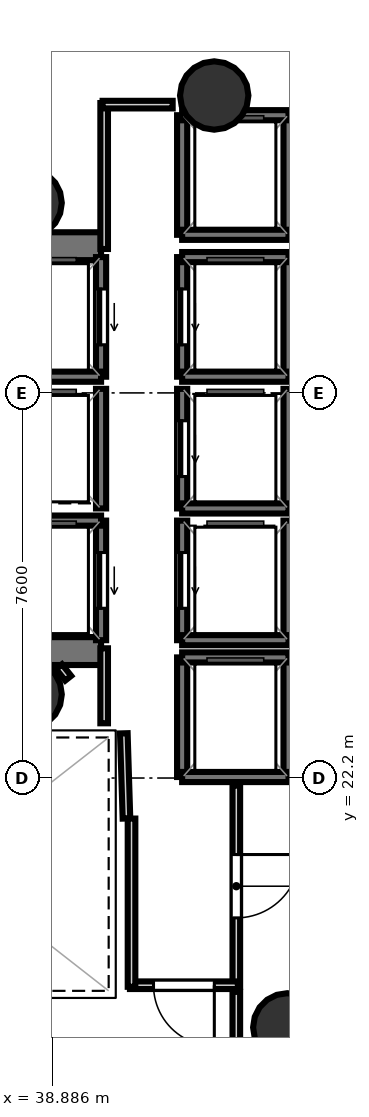
"""IFC4 building model, lengths in metres.
Left out: names, types, materials, properties, quantities, classifications, styles, units other than length and angle.
Written with IfcOpenShell. Run it as: python <this file> out.ifc"""

import sys

from ifc_helpers import new_model, si_unit, direction, frame, frame_2d, origin, origin_2d, place, context, subcontext, project, spatial, rectangle, hollow_circle, extrude, element, fill, save


model = new_model("IFC4")
c1 = context("Model", 3, precision=1e-05, world=origin(), true_north=direction((0.0, 1.0)))
c2 = subcontext(c1, "Body", "Model", "MODEL_VIEW")
j1 = project(units=[si_unit("LENGTHUNIT", "METRE"), si_unit("PLANEANGLEUNIT", "RADIAN")], contexts=[c1])
p1 = place(None, origin())
s1 = spatial("IfcSite", under=j1, at=p1, CompositionType="ELEMENT")
p2 = place(p1, origin())
s2 = spatial("IfcBuilding", under=s1, at=p2, CompositionType="ELEMENT")
p3 = place(p2, frame((0.0, 0.0, 155.0)))
s3 = spatial("IfcBuildingStorey", under=s2, at=p3, CompositionType="ELEMENT", Elevation=155.0)
p4 = place(p3, frame((29.23, 32.695, 0.0), z_axis=(0.0, 0.0, 1.0), x_axis=(1.0, 0.0, 0.0)))
e1 = element("IfcWall", 1, at=p4, inside=s3, PredefinedType="SHEAR", context=c2, shape_type="SweptSolid", body=[
    extrude(rectangle(XDim=10.62, YDim=0.55, at=frame_2d((5.31, 0.0))), origin(), (0.0, 0.0, 1.0), 3.52),
])
p5 = place(p4, frame((0.995, 0.0, 0.0)))
e2 = element("IfcOpeningElement", 2, at=p5, cuts=e1, PredefinedType="OPENING", context=c2, shape_type="SweptSolid", body=[
    extrude(rectangle(XDim=1.25, YDim=2.15, at=frame_2d((0.625, 1.075))), frame((0.0, 0.285, 0.0), z_axis=(0.0, -1.0, 0.0), x_axis=(1.0, 0.0, 0.0)), (0.0, 0.0, 1.0), 0.57),
])
p6 = place(p3, frame((29.23, 24.705, 0.0), z_axis=(0.0, 0.0, 1.0), x_axis=(1.0, 0.0, 0.0)))
e3 = element("IfcWall", 3, at=p6, inside=s3, PredefinedType="SHEAR", context=c2, shape_type="SweptSolid", body=[
    extrude(rectangle(XDim=10.62, YDim=0.55, at=frame_2d((5.31, 0.0))), origin(), (0.0, 0.0, 1.0), 3.52),
])
p7 = place(p6, frame((0.795, 0.0, 0.0)))
e4 = element("IfcOpeningElement", 4, at=p7, cuts=e3, PredefinedType="OPENING", context=c2, shape_type="SweptSolid", body=[
    extrude(rectangle(XDim=1.25, YDim=2.15, at=frame_2d((0.625, 1.075))), frame((0.0, 0.285, 0.0), z_axis=(0.0, -1.0, 0.0), x_axis=(1.0, 0.0, 0.0)), (0.0, 0.0, 1.0), 0.57),
])
for number, where, z_axis, x_axis in (
    (5, (38.4, 33.55, 0.0), (0.0, 0.0, 1.0), (1.0, 0.0, 0.0)),
    (6, (38.4, 23.85, 0.0), (0.0, 0.0, 1.0), (1.0, 0.0, 0.0)),
    (7, (42.083, 35.669, 0.0), (0.0, 0.0, 1.0), (1.0, 0.0, 0.0)),
    (8, (43.525, 17.279, 0.0), (0.0, 0.0, 1.0), (1.0, 0.0, 0.0)),
):
    element("IfcColumn", number, at=place(p3, frame(where, z_axis=z_axis, x_axis=x_axis)), inside=s3, PredefinedType="COLUMN", context=c2, shape_type="SweptSolid", body=[
        extrude(hollow_circle(Radius=0.675, WallThickness=0.032, at=origin_2d()), origin(), (0.0, 0.0, 1.0), 3.7),
    ])
p8 = place(p3, frame((39.85, 30.12, 0.0), z_axis=(0.0, 0.0, 1.0), x_axis=(0.0, 1.0, 0.0)))
e9 = element("IfcWall", 9, at=p8, inside=s3, PredefinedType="SOLIDWALL", context=c2, shape_type="SweptSolid", body=[
    extrude(rectangle(XDim=2.36, YDim=0.2, at=frame_2d((1.18, 0.0))), origin(), (0.0, 0.0, 1.0), 3.52),
])
p9 = place(p8, frame((0.63, 0.0, 0.0)))
e10 = element("IfcOpeningElement", 10, at=p9, cuts=e9, PredefinedType="OPENING", context=c2, shape_type="SweptSolid", body=[
    extrude(rectangle(XDim=1.1, YDim=2.15, at=frame_2d((0.55, 1.075))), frame((0.0, 0.11, 0.0), z_axis=(0.0, -1.0, 0.0), x_axis=(1.0, 0.0, 0.0)), (0.0, 0.0, 1.0), 0.22),
])
p10 = place(p3, frame((37.75, 30.12, 0.0), z_axis=(0.0, 0.0, 1.0), x_axis=(1.0, 0.0, 0.0)))
e11 = element("IfcWall", 11, at=p10, inside=s3, PredefinedType="SOLIDWALL", context=c2, shape_type="SweptSolid", body=[
    extrude(rectangle(XDim=2.1, YDim=0.2, at=frame_2d((1.05, 0.0))), origin(), (0.0, 0.0, 1.0), 3.52),
])
p11 = place(p3, frame((39.85, 24.92, 0.0), z_axis=(0.0, 0.0, 1.0), x_axis=(0.0, 1.0, 0.0)))
e12 = element("IfcWall", 12, at=p11, inside=s3, PredefinedType="SOLIDWALL", context=c2, shape_type="SweptSolid", body=[
    extrude(rectangle(XDim=2.36, YDim=0.2, at=frame_2d((1.18, 0.0))), origin(), (0.0, 0.0, 1.0), 3.52),
])
p12 = place(p11, frame((0.63, 0.0, 0.0)))
e13 = element("IfcOpeningElement", 13, at=p12, cuts=e12, PredefinedType="OPENING", context=c2, shape_type="SweptSolid", body=[
    extrude(rectangle(XDim=1.1, YDim=2.15, at=frame_2d((0.55, 1.075))), frame((0.0, 0.11, 0.0), z_axis=(0.0, -1.0, 0.0), x_axis=(1.0, 0.0, 0.0)), (0.0, 0.0, 1.0), 0.22),
])
p13 = place(p3, frame((37.75, 27.28, 0.0), z_axis=(0.0, 0.0, 1.0), x_axis=(1.0, 0.0, 0.0)))
e14 = element("IfcWall", 14, at=p13, inside=s3, PredefinedType="SOLIDWALL", context=c2, shape_type="SweptSolid", body=[
    extrude(rectangle(XDim=2.1, YDim=0.2, at=frame_2d((1.05, 0.0))), origin(), (0.0, 0.0, 1.0), 3.52),
])
p14 = place(p3, frame((43.55, 30.12, 0.0), z_axis=(0.0, 0.0, 1.0), x_axis=(0.0, 1.0, 0.0)))
e15 = element("IfcWall", 15, at=p14, inside=s3, PredefinedType="SOLIDWALL", context=c2, shape_type="SweptSolid", body=[
    extrude(rectangle(XDim=2.36, YDim=0.2, at=frame_2d((1.18, 0.0))), origin(), (0.0, 0.0, 1.0), 3.52),
])
p15 = place(p3, frame((41.45, 30.12, 0.0), z_axis=(0.0, 0.0, 1.0), x_axis=(0.0, 1.0, 0.0)))
e16 = element("IfcWall", 16, at=p15, inside=s3, PredefinedType="SOLIDWALL", context=c2, shape_type="SweptSolid", body=[
    extrude(rectangle(XDim=2.36, YDim=0.2, at=frame_2d((1.18, 0.0))), origin(), (0.0, 0.0, 1.0), 3.52),
])
p16 = place(p15, frame((0.63, 0.0, 0.0)))
e17 = element("IfcOpeningElement", 17, at=p16, cuts=e16, PredefinedType="OPENING", context=c2, shape_type="SweptSolid", body=[
    extrude(rectangle(XDim=1.1, YDim=2.15, at=frame_2d((0.55, 1.075))), frame((0.0, 0.11, 0.0), z_axis=(0.0, -1.0, 0.0), x_axis=(1.0, 0.0, 0.0)), (0.0, 0.0, 1.0), 0.22),
])
for number, where, z_axis, x_axis in (
    (18, (41.45, 32.48, 0.0), (0.0, 0.0, 1.0), (1.0, 0.0, 0.0)),
    (19, (41.45, 30.12, 0.0), (0.0, 0.0, 1.0), (1.0, 0.0, 0.0)),
):
    element("IfcWall", number, at=place(p3, frame(where, z_axis=z_axis, x_axis=x_axis)), inside=s3, PredefinedType="SOLIDWALL", context=c2, shape_type="SweptSolid", body=[
        extrude(rectangle(XDim=2.1, YDim=0.2, at=frame_2d((1.05, 0.0))), origin(), (0.0, 0.0, 1.0), 3.52),
    ])
p17 = place(p3, frame((43.55, 27.52, 0.0), z_axis=(0.0, 0.0, 1.0), x_axis=(0.0, 1.0, 0.0)))
e20 = element("IfcWall", 20, at=p17, inside=s3, PredefinedType="SOLIDWALL", context=c2, shape_type="SweptSolid", body=[
    extrude(rectangle(XDim=2.36, YDim=0.2, at=frame_2d((1.18, 0.0))), origin(), (0.0, 0.0, 1.0), 3.52),
])
p18 = place(p3, frame((41.45, 27.52, 0.0), z_axis=(0.0, 0.0, 1.0), x_axis=(0.0, 1.0, 0.0)))
e21 = element("IfcWall", 21, at=p18, inside=s3, PredefinedType="SOLIDWALL", context=c2, shape_type="SweptSolid", body=[
    extrude(rectangle(XDim=2.36, YDim=0.2, at=frame_2d((1.18, 0.0))), origin(), (0.0, 0.0, 1.0), 3.52),
])
p19 = place(p18, frame((0.63, 0.0, 0.0)))
e22 = element("IfcOpeningElement", 22, at=p19, cuts=e21, PredefinedType="OPENING", context=c2, shape_type="SweptSolid", body=[
    extrude(rectangle(XDim=1.1, YDim=2.15, at=frame_2d((0.55, 1.075))), frame((0.0, 0.11, 0.0), z_axis=(0.0, -1.0, 0.0), x_axis=(1.0, 0.0, 0.0)), (0.0, 0.0, 1.0), 0.22),
])
p20 = place(p3, frame((41.45, 27.52, 0.0), z_axis=(0.0, 0.0, 1.0), x_axis=(1.0, 0.0, 0.0)))
e23 = element("IfcWall", 23, at=p20, inside=s3, PredefinedType="SOLIDWALL", context=c2, shape_type="SweptSolid", body=[
    extrude(rectangle(XDim=2.1, YDim=0.2, at=frame_2d((1.05, 0.0))), origin(), (0.0, 0.0, 1.0), 3.52),
])
p21 = place(p3, frame((43.55, 24.92, 0.0), z_axis=(0.0, 0.0, 1.0), x_axis=(0.0, 1.0, 0.0)))
e24 = element("IfcWall", 24, at=p21, inside=s3, PredefinedType="SOLIDWALL", context=c2, shape_type="SweptSolid", body=[
    extrude(rectangle(XDim=2.36, YDim=0.2, at=frame_2d((1.18, 0.0))), origin(), (0.0, 0.0, 1.0), 3.52),
])
p22 = place(p3, frame((41.45, 24.92, 0.0), z_axis=(0.0, 0.0, 1.0), x_axis=(0.0, 1.0, 0.0)))
e25 = element("IfcWall", 25, at=p22, inside=s3, PredefinedType="SOLIDWALL", context=c2, shape_type="SweptSolid", body=[
    extrude(rectangle(XDim=2.36, YDim=0.2, at=frame_2d((1.18, 0.0))), origin(), (0.0, 0.0, 1.0), 3.52),
])
p23 = place(p22, frame((0.63, 0.0, 0.0)))
e26 = element("IfcOpeningElement", 26, at=p23, cuts=e25, PredefinedType="OPENING", context=c2, shape_type="SweptSolid", body=[
    extrude(rectangle(XDim=1.1, YDim=2.15, at=frame_2d((0.55, 1.075))), frame((0.0, 0.11, 0.0), z_axis=(0.0, -1.0, 0.0), x_axis=(1.0, 0.0, 0.0)), (0.0, 0.0, 1.0), 0.22),
])
p24 = place(p3, frame((41.45, 24.92, 0.0), z_axis=(0.0, 0.0, 1.0), x_axis=(1.0, 0.0, 0.0)))
e27 = element("IfcWall", 27, at=p24, inside=s3, PredefinedType="SOLIDWALL", context=c2, shape_type="SweptSolid", body=[
    extrude(rectangle(XDim=2.1, YDim=0.2, at=frame_2d((1.05, 0.0))), origin(), (0.0, 0.0, 1.0), 3.52),
])
p25 = place(p3, frame((39.85, 27.52, 0.0), z_axis=(0.0, 0.0, 1.0), x_axis=(0.0, 1.0, 0.0)))
e28 = element("IfcWall", 28, at=p25, inside=s3, PredefinedType="SOLIDWALL", context=c2, shape_type="SweptSolid", body=[
    extrude(rectangle(XDim=2.36, YDim=0.2, at=frame_2d((1.18, 0.0))), origin(), (0.0, 0.0, 1.0), 3.52),
])
for number, where, z_axis, x_axis in (
    (29, (43.55, 22.22, 0.0), (0.0, 0.0, 1.0), (0.0, 1.0, 0.0)),
    (30, (41.45, 22.22, 0.0), (0.0, 0.0, 1.0), (0.0, 1.0, 0.0)),
):
    element("IfcWall", number, at=place(p3, frame(where, z_axis=z_axis, x_axis=x_axis)), inside=s3, PredefinedType="SOLIDWALL", context=c2, shape_type="SweptSolid", body=[
        extrude(rectangle(XDim=2.36, YDim=0.2, at=frame_2d((1.18, 0.0))), origin(), (0.0, 0.0, 1.0), 3.52),
    ])
for number, where, z_axis, x_axis in (
    (31, (41.45, 24.58, 0.0), (0.0, 0.0, 1.0), (1.0, 0.0, 0.0)),
    (32, (41.45, 22.22, 0.0), (0.0, 0.0, 1.0), (1.0, 0.0, 0.0)),
):
    element("IfcWall", number, at=place(p3, frame(where, z_axis=z_axis, x_axis=x_axis)), inside=s3, PredefinedType="SOLIDWALL", context=c2, shape_type="SweptSolid", body=[
        extrude(rectangle(XDim=2.1, YDim=0.2, at=frame_2d((1.05, 0.0))), origin(), (0.0, 0.0, 1.0), 3.52),
    ])
for number, where, z_axis, x_axis in (
    (33, (43.55, 32.92, 0.0), (0.0, 0.0, 1.0), (0.0, 1.0, 0.0)),
    (34, (41.45, 32.92, 0.0), (0.0, 0.0, 1.0), (0.0, 1.0, 0.0)),
):
    element("IfcWall", number, at=place(p3, frame(where, z_axis=z_axis, x_axis=x_axis)), inside=s3, PredefinedType="SOLIDWALL", context=c2, shape_type="SweptSolid", body=[
        extrude(rectangle(XDim=2.36, YDim=0.2, at=frame_2d((1.18, 0.0))), origin(), (0.0, 0.0, 1.0), 3.52),
    ])
for number, where, z_axis, x_axis in (
    (35, (41.45, 35.28, 0.0), (0.0, 0.0, 1.0), (1.0, 0.0, 0.0)),
    (36, (41.45, 32.92, 0.0), (0.0, 0.0, 1.0), (1.0, 0.0, 0.0)),
):
    element("IfcWall", number, at=place(p3, frame(where, z_axis=z_axis, x_axis=x_axis)), inside=s3, PredefinedType="SOLIDWALL", context=c2, shape_type="SweptSolid", body=[
        extrude(rectangle(XDim=2.1, YDim=0.2, at=frame_2d((1.05, 0.0))), origin(), (0.0, 0.0, 1.0), 3.52),
    ])
p26 = place(p3, frame((40.351, 21.401, 0.0), z_axis=(0.0, 0.0, 1.0), x_axis=(-0.031058045979, 0.999517582527, 0.0)))
e37 = element("IfcWall", 37, at=p26, inside=s3, PredefinedType="PARTITIONING", context=c2, shape_type="SweptSolid", body=[
    extrude(rectangle(XDim=1.682, YDim=0.15, at=frame_2d((0.841, 0.0))), origin(), (0.0, 0.0, 1.0), 2.84),
])
p27 = place(p3, frame((39.911, 23.28, 0.0), z_axis=(0.0, 0.0, 1.0), x_axis=(0.0, 1.0, 0.0)))
e38 = element("IfcWall", 38, at=p27, inside=s3, PredefinedType="PARTITIONING", context=c2, shape_type="SweptSolid", body=[
    extrude(rectangle(XDim=1.48, YDim=0.15, at=frame_2d((0.74, 0.0))), origin(), (0.0, 0.0, 1.0), 2.84),
])
p28 = place(p3, frame((39.911, 32.64, 0.0), z_axis=(0.0, 0.0, 1.0), x_axis=(0.0, 1.0, 0.0)))
e39 = element("IfcWall", 39, at=p28, inside=s3, PredefinedType="PARTITIONING", context=c2, shape_type="SweptSolid", body=[
    extrude(rectangle(XDim=2.88, YDim=0.15, at=frame_2d((1.44, 0.0))), origin(), (0.0, 0.0, 1.0), 2.84),
])
p29 = place(p3, frame((39.88, 35.489, 0.0), z_axis=(0.0, 0.0, 1.0), x_axis=(1.0, 0.0, 0.0)))
e40 = element("IfcWall", 40, at=p29, inside=s3, PredefinedType="PARTITIONING", context=c2, shape_type="SweptSolid", body=[
    extrude(rectangle(XDim=1.383, YDim=0.15, at=frame_2d((0.691, 0.0))), origin(), (0.0, 0.0, 1.0), 2.84),
])
p30 = place(p3, frame((42.519, 22.05, 0.0), z_axis=(0.0, 0.0, 1.0), x_axis=(0.0, -1.0, 0.0)))
e41 = element("IfcWall", 41, at=p30, inside=s3, PredefinedType="PARTITIONING", context=c2, shape_type="SweptSolid", body=[
    extrude(rectangle(XDim=3.97, YDim=0.15, at=frame_2d((1.985, 0.0))), origin(), (0.0, 0.0, 1.0), 2.84),
])
p31 = place(p30, frame((1.36, 0.0, 0.0)))
e42 = element("IfcOpeningElement", 42, at=p31, cuts=e41, PredefinedType="OPENING", context=c2, shape_type="SweptSolid", body=[
    extrude(rectangle(XDim=1.25, YDim=2.2, at=frame_2d((0.625, 1.1))), frame((0.0, 0.085, 0.0), z_axis=(0.0, -1.0, 0.0), x_axis=(1.0, 0.0, 0.0)), (0.0, 0.0, 1.0), 0.17),
])
p32 = place(p3, frame((42.55, 18.111, 0.0), z_axis=(0.0, 0.0, 1.0), x_axis=(-1.0, 0.0, 0.0)))
e43 = element("IfcWall", 43, at=p32, inside=s3, PredefinedType="PARTITIONING", context=c2, shape_type="SweptSolid", body=[
    extrude(rectangle(XDim=2.13, YDim=0.15, at=frame_2d((1.065, 0.0))), origin(), (0.0, 0.0, 1.0), 2.84),
])
p33 = place(p32, frame((0.465, 0.0, 0.0)))
e44 = element("IfcOpeningElement", 44, at=p33, cuts=e43, PredefinedType="OPENING", context=c2, shape_type="SweptSolid", body=[
    extrude(rectangle(XDim=1.2, YDim=2.15, at=frame_2d((0.6, 1.075))), frame((0.0, 0.085, 0.0), z_axis=(0.0, -1.0, 0.0), x_axis=(1.0, 0.0, 0.0)), (0.0, 0.0, 1.0), 0.17),
])
p34 = place(p3, frame((40.451, 18.08, 0.0), z_axis=(0.0, 0.0, 1.0), x_axis=(0.0, 1.0, 0.0)))
e45 = element("IfcWall", 45, at=p34, inside=s3, PredefinedType="PARTITIONING", context=c2, shape_type="SweptSolid", body=[
    extrude(rectangle(XDim=3.32, YDim=0.15, at=frame_2d((1.66, 0.0))), origin(), (0.0, 0.0, 1.0), 2.84),
])
p35 = place(p3, frame((39.202, 24.169, 0.0), z_axis=(0.0, 0.0, 1.0), x_axis=(-0.622453876994, 0.782656483405, 0.0)))
e46 = element("IfcWall", 46, at=p35, inside=s3, PredefinedType="PARTITIONING", context=c2, shape_type="SweptSolid", body=[
    extrude(rectangle(XDim=0.292, YDim=0.15, at=frame_2d((0.146, 0.0))), origin(), (0.0, 0.0, 1.0), 2.84),
])
p36 = place(p3, frame((42.519, 17.98, 0.0), z_axis=(0.0, 0.0, 1.0), x_axis=(0.0, -1.0, 0.0)))
e47 = element("IfcWall", 47, at=p36, inside=s3, PredefinedType="PARTITIONING", context=c2, shape_type="SweptSolid", body=[
    extrude(rectangle(XDim=3.201, YDim=0.15, at=frame_2d((1.601, 0.0))), origin(), (0.0, 0.0, 1.0), 2.84),
])
p37 = place(p9, origin())
e48 = element("IfcDoor", 48, at=p37, inside=s3, OperationType="SLIDING_TO_LEFT", PredefinedType="DOOR", context=c2, shape_type="SweptSolid", body=[
    extrude(rectangle(XDim=1.1, YDim=2.15, at=frame_2d((0.55, 1.075))), frame((0.0, 0.025, 0.0), z_axis=(0.0, -1.0, 0.0), x_axis=(1.0, 0.0, 0.0)), (0.0, 0.0, 1.0), 0.05),
])
fill(e10, e48)
p38 = place(p12, origin())
e49 = element("IfcDoor", 49, at=p38, inside=s3, OperationType="SLIDING_TO_LEFT", PredefinedType="DOOR", context=c2, shape_type="SweptSolid", body=[
    extrude(rectangle(XDim=1.1, YDim=2.15, at=frame_2d((0.55, 1.075))), frame((0.0, 0.025, 0.0), z_axis=(0.0, -1.0, 0.0), x_axis=(1.0, 0.0, 0.0)), (0.0, 0.0, 1.0), 0.05),
])
fill(e13, e49)
p39 = place(p16, origin())
e50 = element("IfcDoor", 50, at=p39, inside=s3, OperationType="SLIDING_TO_LEFT", PredefinedType="DOOR", context=c2, shape_type="SweptSolid", body=[
    extrude(rectangle(XDim=1.1, YDim=2.15, at=frame_2d((0.55, 1.075))), frame((0.0, 0.025, 0.0), z_axis=(0.0, -1.0, 0.0), x_axis=(1.0, 0.0, 0.0)), (0.0, 0.0, 1.0), 0.05),
])
fill(e17, e50)
p40 = place(p19, origin())
e51 = element("IfcDoor", 51, at=p40, inside=s3, OperationType="SLIDING_TO_LEFT", PredefinedType="DOOR", context=c2, shape_type="SweptSolid", body=[
    extrude(rectangle(XDim=1.1, YDim=2.15, at=frame_2d((0.55, 1.075))), frame((0.0, 0.025, 0.0), z_axis=(0.0, -1.0, 0.0), x_axis=(1.0, 0.0, 0.0)), (0.0, 0.0, 1.0), 0.05),
])
fill(e22, e51)
p41 = place(p23, origin())
e52 = element("IfcDoor", 52, at=p41, inside=s3, OperationType="SLIDING_TO_LEFT", PredefinedType="DOOR", context=c2, shape_type="SweptSolid", body=[
    extrude(rectangle(XDim=1.1, YDim=2.15, at=frame_2d((0.55, 1.075))), frame((0.0, 0.025, 0.0), z_axis=(0.0, -1.0, 0.0), x_axis=(1.0, 0.0, 0.0)), (0.0, 0.0, 1.0), 0.05),
])
fill(e26, e52)
p42 = place(p33, origin())
e53 = element("IfcDoor", 53, at=p42, inside=s3, OperationType="SINGLE_SWING_LEFT", PredefinedType="DOOR", context=c2, shape_type="SweptSolid", body=[
    extrude(rectangle(XDim=1.2, YDim=2.15, at=frame_2d((0.6, 1.075))), frame((0.0, 0.025, 0.0), z_axis=(0.0, -1.0, 0.0), x_axis=(1.0, 0.0, 0.0)), (0.0, 0.0, 1.0), 0.05),
])
fill(e44, e53)
p43 = place(p31, origin())
e54 = element("IfcDoor", 54, at=p43, inside=s3, OperationType="SINGLE_SWING_LEFT", PredefinedType="DOOR", context=c2, shape_type="SweptSolid", body=[
    extrude(rectangle(XDim=1.25, YDim=2.2, at=frame_2d((0.625, 1.1))), frame((0.0, 0.025, 0.0), z_axis=(0.0, -1.0, 0.0), x_axis=(1.0, 0.0, 0.0)), (0.0, 0.0, 1.0), 0.05),
])
fill(e42, e54)
save(model, sys.argv[1])
